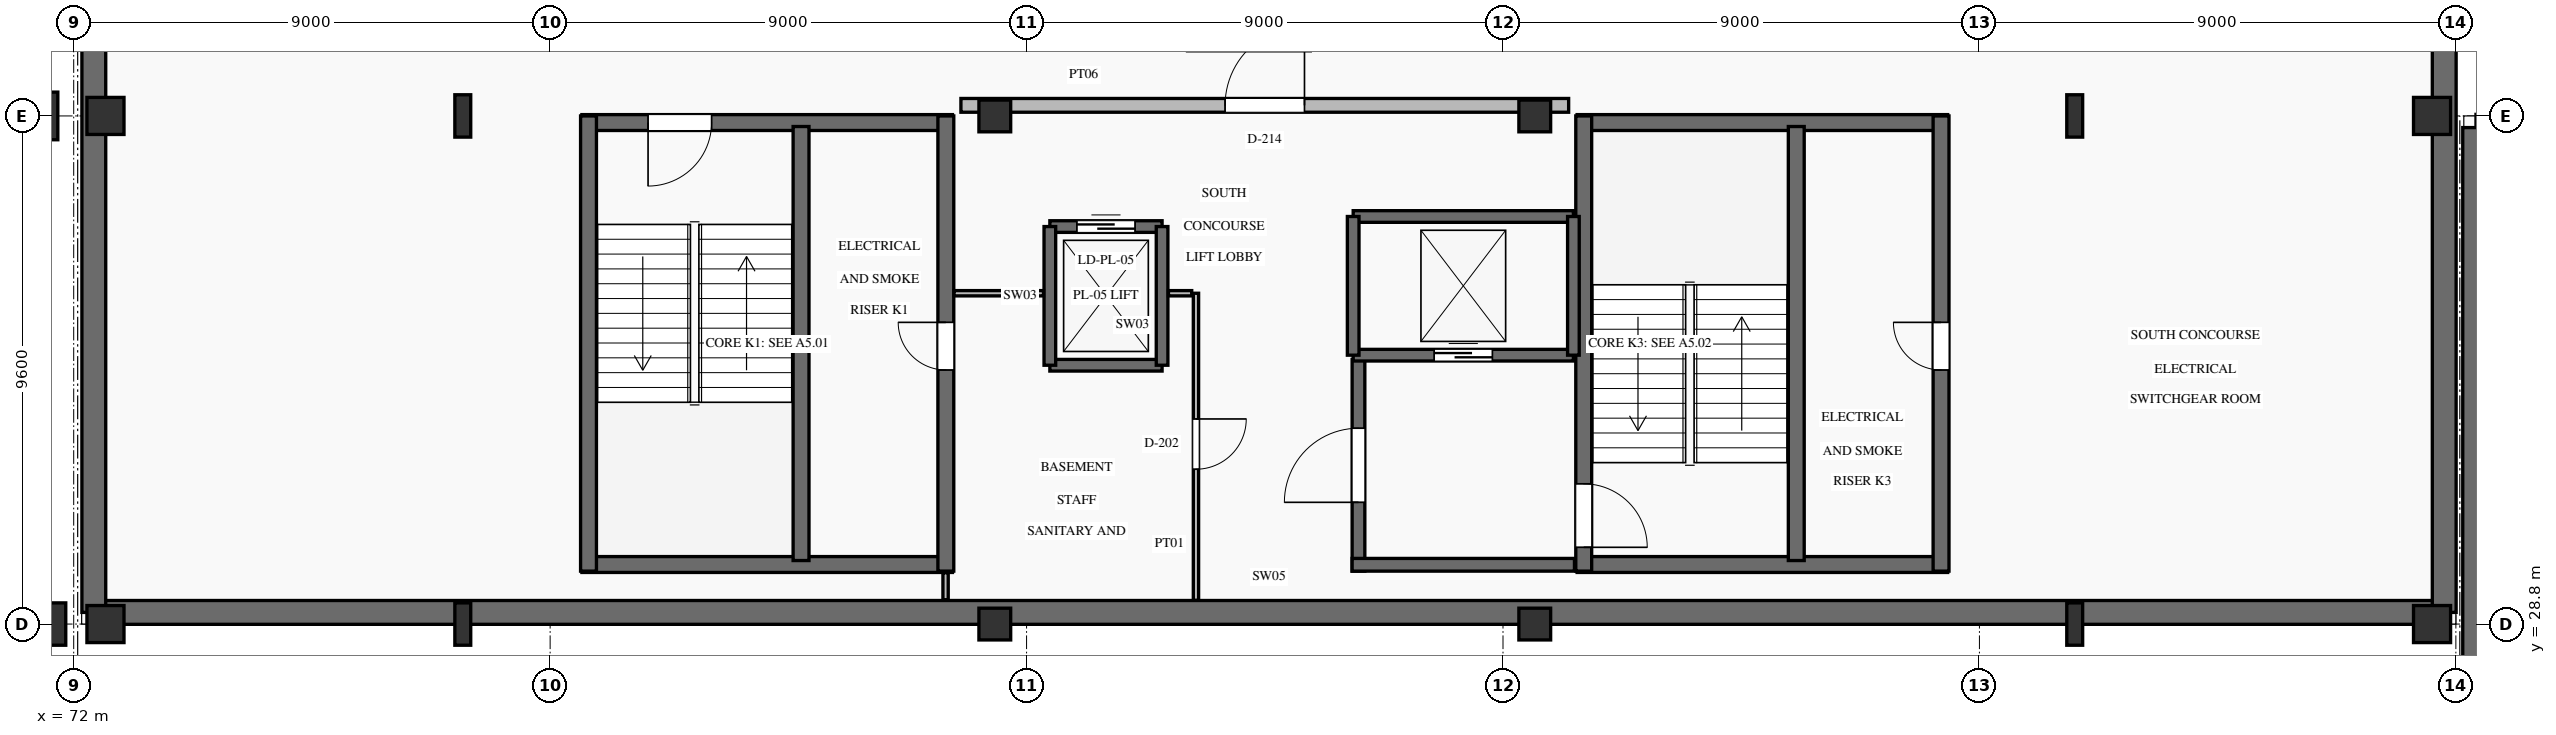
"""IFC4 building model, lengths in metres.
Left out: names, types, materials, properties, quantities, classifications, styles, units other than length and angle.
Written with IfcOpenShell. Run it as: python <this file> out.ifc"""

import sys

from ifc_helpers import new_model, si_unit, direction, frame, frame_2d, origin, origin_2d, place, context, subcontext, project, spatial, rectangle, i_section, extrude, element, fill, save


model = new_model("IFC4")
c1 = context("Model", 3, precision=1e-05, world=origin(), true_north=direction((0.0, 1.0)))
c2 = subcontext(c1, "Body", "Model", "MODEL_VIEW")
j1 = project(units=[si_unit("LENGTHUNIT", "METRE"), si_unit("PLANEANGLEUNIT", "RADIAN")], contexts=[c1])
p1 = place(None, origin())
s1 = spatial("IfcSite", under=j1, at=p1, CompositionType="ELEMENT")
p2 = place(p1, origin())
s2 = spatial("IfcBuilding", under=s1, at=p2, CompositionType="ELEMENT")
p3 = place(p2, frame((0.0, 0.0, -4.5)))
s3 = spatial("IfcBuildingStorey", under=s2, at=p3, CompositionType="ELEMENT", Elevation=-4.5)
p4 = place(p3, frame((71.55, 28.8, 0.0), z_axis=(0.0, 0.0, 1.0), x_axis=(1.0, 0.0, 0.0)))
e1 = element("IfcColumn", 1, at=p4, inside=s3, PredefinedType="COLUMN", context=c2, shape_type="SweptSolid", body=[
    extrude(rectangle(XDim=0.6, YDim=0.8, at=origin_2d()), origin(), (0.0, 0.0, 1.0), 4.5),
])
p5 = place(p3, frame((71.55, 38.4, 0.0), z_axis=(0.0, 0.0, 1.0), x_axis=(1.0, 0.0, 0.0)))
e2 = element("IfcColumn", 2, at=p5, inside=s3, PredefinedType="COLUMN", context=c2, shape_type="SweptSolid", body=[
    extrude(i_section(OverallWidth=0.3, OverallDepth=0.9, WebThickness=0.019, FlangeThickness=0.035, FilletRadius=0.03, at=origin_2d()), origin(), (0.0, 0.0, 1.0), 4.5),
])
for number, where, z_axis, x_axis in (
    (3, (72.6, 28.8, 0.0), (0.0, 0.0, 1.0), (1.0, 0.0, 0.0)),
    (4, (116.55, 28.8, 0.0), (0.0, 0.0, 1.0), (1.0, 0.0, 0.0)),
):
    element("IfcColumn", number, at=place(p3, frame(where, z_axis=z_axis, x_axis=x_axis)), inside=s3, PredefinedType="COLUMN", context=c2, shape_type="SweptSolid", body=[
        extrude(rectangle(XDim=0.7, YDim=0.7, at=origin_2d()), origin(), (0.0, 0.0, 1.0), 4.5),
    ])
for number, where, z_axis, x_axis in (
    (5, (79.35, 28.8, 0.0), (0.0, 0.0, 1.0), (1.0, 0.0, 0.0)),
    (6, (109.8, 28.8, 0.0), (0.0, 0.0, 1.0), (1.0, 0.0, 0.0)),
):
    element("IfcColumn", number, at=place(p3, frame(where, z_axis=z_axis, x_axis=x_axis)), inside=s3, PredefinedType="COLUMN", context=c2, shape_type="SweptSolid", body=[
        extrude(i_section(OverallWidth=0.3, OverallDepth=0.8, WebThickness=0.018, FlangeThickness=0.033, FilletRadius=0.03, at=origin_2d()), origin(), (0.0, 0.0, 1.0), 4.5),
    ])
for number, where, z_axis, x_axis in (
    (7, (72.6, 38.4, 0.0), (0.0, 0.0, 1.0), (1.0, 0.0, 0.0)),
    (8, (116.55, 38.4, 0.0), (0.0, 0.0, 1.0), (1.0, 0.0, 0.0)),
):
    element("IfcColumn", number, at=place(p3, frame(where, z_axis=z_axis, x_axis=x_axis)), inside=s3, PredefinedType="COLUMN", context=c2, shape_type="SweptSolid", body=[
        extrude(rectangle(XDim=0.7, YDim=0.7, at=origin_2d()), origin(), (0.0, 0.0, 1.0), 4.5),
    ])
for number, where, z_axis, x_axis in (
    (9, (79.35, 38.4, 0.0), (0.0, 0.0, 1.0), (1.0, 0.0, 0.0)),
    (10, (109.8, 38.4, 0.0), (0.0, 0.0, 1.0), (1.0, 0.0, 0.0)),
):
    element("IfcColumn", number, at=place(p3, frame(where, z_axis=z_axis, x_axis=x_axis)), inside=s3, PredefinedType="COLUMN", context=c2, shape_type="SweptSolid", body=[
        extrude(i_section(OverallWidth=0.3, OverallDepth=0.8, WebThickness=0.018, FlangeThickness=0.033, FilletRadius=0.03, at=origin_2d()), origin(), (0.0, 0.0, 1.0), 4.5),
    ])
for number, where, z_axis, x_axis in (
    (11, (89.4, 28.8, 0.0), (0.0, 0.0, 1.0), (1.0, 0.0, 0.0)),
    (12, (89.4, 38.4, 0.0), (0.0, 0.0, 1.0), (1.0, 0.0, 0.0)),
    (13, (99.6, 28.8, 0.0), (0.0, 0.0, 1.0), (1.0, 0.0, 0.0)),
    (14, (99.6, 38.4, 0.0), (0.0, 0.0, 1.0), (1.0, 0.0, 0.0)),
):
    element("IfcColumn", number, at=place(p3, frame(where, z_axis=z_axis, x_axis=x_axis)), inside=s3, PredefinedType="COLUMN", context=c2, shape_type="SweptSolid", body=[
        extrude(rectangle(XDim=0.6, YDim=0.6, at=origin_2d()), origin(), (0.0, 0.0, 1.0), 4.5),
    ])
p6 = place(p3, frame((72.38, 29.02, 0.0), z_axis=(0.0, 0.0, 1.0), x_axis=(1.0, 0.0, 0.0)))
e15 = element("IfcWall", 15, at=p6, inside=s3, PredefinedType="SHEAR", context=c2, shape_type="SweptSolid", body=[
    extrude(rectangle(XDim=44.4, YDim=0.45, at=frame_2d((22.2, 0.0))), origin(), (0.0, 0.0, 1.0), 4.2),
])
for number, where, z_axis, x_axis in (
    (16, (116.78, 29.02, 0.0), (0.0, 0.0, 1.0), (0.0, 1.0, 0.0)),
    (17, (72.38, 95.78, 0.0), (0.0, 0.0, 1.0), (0.0, -1.0, 0.0)),
):
    element("IfcWall", number, at=place(p3, frame(where, z_axis=z_axis, x_axis=x_axis)), inside=s3, PredefinedType="SHEAR", context=c2, shape_type="SweptSolid", body=[
        extrude(rectangle(XDim=66.76, YDim=0.45, at=frame_2d((33.38, 0.0))), origin(), (0.0, 0.0, 1.0), 4.2),
    ])
p7 = place(p3, frame((179.62, 38.18, 0.0), z_axis=(0.0, 0.0, 1.0), x_axis=(-1.0, 0.0, 0.0)))
e18 = element("IfcWall", 18, at=p7, inside=s3, PredefinedType="SHEAR", context=c2, shape_type="SweptSolid", body=[
    extrude(rectangle(XDim=62.24, YDim=0.5, at=frame_2d((31.12, 0.0))), origin(), (0.0, 0.0, 1.0), 4.2),
])
p8 = place(p3, frame((117.38, 38.18, 0.0), z_axis=(0.0, 0.0, 1.0), x_axis=(0.0, -1.0, 0.0)))
e19 = element("IfcWall", 19, at=p8, inside=s3, PredefinedType="SHEAR", context=c2, shape_type="SweptSolid", body=[
    extrude(rectangle(XDim=37.96, YDim=0.5, at=frame_2d((18.98, 0.0))), origin(), (0.0, 0.0, 1.0), 4.2),
])
p9 = place(p3, frame((81.6, 29.925, 0.0), z_axis=(0.0, 0.0, 1.0), x_axis=(1.0, 0.0, 0.0)))
e20 = element("IfcWall", 20, at=p9, inside=s3, PredefinedType="SHEAR", context=c2, shape_type="SweptSolid", body=[
    extrude(rectangle(XDim=7.0, YDim=0.3, at=frame_2d((3.5, 0.0))), origin(), (0.0, 0.0, 1.0), 4.5),
])
p10 = place(p3, frame((81.6, 38.275, 0.0), z_axis=(0.0, 0.0, 1.0), x_axis=(1.0, 0.0, 0.0)))
e21 = element("IfcWall", 21, at=p10, inside=s3, PredefinedType="SHEAR", context=c2, shape_type="SweptSolid", body=[
    extrude(rectangle(XDim=7.0, YDim=0.3, at=frame_2d((3.5, 0.0))), origin(), (0.0, 0.0, 1.0), 4.5),
])
p11 = place(p10, frame((1.25, 0.0, 0.0)))
e22 = element("IfcOpeningElement", 22, at=p11, cuts=e21, PredefinedType="OPENING", context=c2, shape_type="SweptSolid", body=[
    extrude(rectangle(XDim=1.2, YDim=2.15, at=frame_2d((0.6, 1.075))), frame((0.0, 0.165, 0.0), z_axis=(0.0, -1.0, 0.0), x_axis=(1.0, 0.0, 0.0)), (0.0, 0.0, 1.0), 0.33),
])
p12 = place(p3, frame((81.725, 29.8, 0.0), z_axis=(0.0, 0.0, 1.0), x_axis=(0.0, 1.0, 0.0)))
e23 = element("IfcWall", 23, at=p12, inside=s3, PredefinedType="SHEAR", context=c2, shape_type="SweptSolid", body=[
    extrude(rectangle(XDim=8.6, YDim=0.3, at=frame_2d((4.3, 0.0))), origin(), (0.0, 0.0, 1.0), 4.5),
])
p13 = place(p3, frame((88.475, 29.8, 0.0), z_axis=(0.0, 0.0, 1.0), x_axis=(0.0, 1.0, 0.0)))
e24 = element("IfcWall", 24, at=p13, inside=s3, PredefinedType="SHEAR", context=c2, shape_type="SweptSolid", body=[
    extrude(rectangle(XDim=8.6, YDim=0.3, at=frame_2d((4.3, 0.0))), origin(), (0.0, 0.0, 1.0), 4.5),
])
p14 = place(p13, frame((3.8, 0.0, 0.0)))
e25 = element("IfcOpeningElement", 25, at=p14, cuts=e24, PredefinedType="OPENING", context=c2, shape_type="SweptSolid", body=[
    extrude(rectangle(XDim=0.9, YDim=2.05, at=frame_2d((0.45, 1.025))), frame((0.0, 0.165, 0.0), z_axis=(0.0, -1.0, 0.0), x_axis=(1.0, 0.0, 0.0)), (0.0, 0.0, 1.0), 0.33),
])
p15 = place(p3, frame((85.74, 30.0, 0.0), z_axis=(0.0, 0.0, 1.0), x_axis=(0.0, 1.0, 0.0)))
e26 = element("IfcWall", 26, at=p15, inside=s3, PredefinedType="SHEAR", context=c2, shape_type="SweptSolid", body=[
    extrude(rectangle(XDim=8.2, YDim=0.3, at=frame_2d((4.1, 0.0))), origin(), (0.0, 0.0, 1.0), 4.5),
])
for number, where, z_axis, x_axis in (
    (27, (100.4, 29.925, 0.0), (0.0, 0.0, 1.0), (1.0, 0.0, 0.0)),
    (28, (100.4, 38.275, 0.0), (0.0, 0.0, 1.0), (1.0, 0.0, 0.0)),
):
    element("IfcWall", number, at=place(p3, frame(where, z_axis=z_axis, x_axis=x_axis)), inside=s3, PredefinedType="SHEAR", context=c2, shape_type="SweptSolid", body=[
        extrude(rectangle(XDim=7.0, YDim=0.3, at=frame_2d((3.5, 0.0))), origin(), (0.0, 0.0, 1.0), 4.5),
    ])
p16 = place(p3, frame((100.525, 29.8, 0.0), z_axis=(0.0, 0.0, 1.0), x_axis=(0.0, 1.0, 0.0)))
e29 = element("IfcWall", 29, at=p16, inside=s3, PredefinedType="SHEAR", context=c2, shape_type="SweptSolid", body=[
    extrude(rectangle(XDim=8.6, YDim=0.3, at=frame_2d((4.3, 0.0))), origin(), (0.0, 0.0, 1.0), 4.5),
])
p17 = place(p16, frame((0.45, 0.0, 0.0)))
e30 = element("IfcOpeningElement", 30, at=p17, cuts=e29, PredefinedType="OPENING", context=c2, shape_type="SweptSolid", body=[
    extrude(rectangle(XDim=1.2, YDim=2.15, at=frame_2d((0.6, 1.075))), frame((0.0, 0.165, 0.0), z_axis=(0.0, -1.0, 0.0), x_axis=(1.0, 0.0, 0.0)), (0.0, 0.0, 1.0), 0.33),
])
p18 = place(p3, frame((107.275, 29.8, 0.0), z_axis=(0.0, 0.0, 1.0), x_axis=(0.0, 1.0, 0.0)))
e31 = element("IfcWall", 31, at=p18, inside=s3, PredefinedType="SHEAR", context=c2, shape_type="SweptSolid", body=[
    extrude(rectangle(XDim=8.6, YDim=0.3, at=frame_2d((4.3, 0.0))), origin(), (0.0, 0.0, 1.0), 4.5),
])
p19 = place(p18, frame((3.8, 0.0, 0.0)))
e32 = element("IfcOpeningElement", 32, at=p19, cuts=e31, PredefinedType="OPENING", context=c2, shape_type="SweptSolid", body=[
    extrude(rectangle(XDim=0.9, YDim=2.05, at=frame_2d((0.45, 1.025))), frame((0.0, 0.165, 0.0), z_axis=(0.0, -1.0, 0.0), x_axis=(1.0, 0.0, 0.0)), (0.0, 0.0, 1.0), 0.33),
])
p20 = place(p3, frame((104.54, 30.0, 0.0), z_axis=(0.0, 0.0, 1.0), x_axis=(0.0, 1.0, 0.0)))
e33 = element("IfcWall", 33, at=p20, inside=s3, PredefinedType="SHEAR", context=c2, shape_type="SweptSolid", body=[
    extrude(rectangle(XDim=8.2, YDim=0.3, at=frame_2d((4.1, 0.0))), origin(), (0.0, 0.0, 1.0), 4.5),
])
p21 = place(p3, frame((96.27, 29.8, 0.0), z_axis=(0.0, 0.0, 1.0), x_axis=(0.0, 1.0, 0.0)))
e34 = element("IfcWall", 34, at=p21, inside=s3, PredefinedType="SHEAR", context=c2, shape_type="SweptSolid", body=[
    extrude(rectangle(XDim=4.0, YDim=0.24, at=frame_2d((2.0, 0.0))), origin(), (0.0, 0.0, 1.0), 4.5),
])
p22 = place(p21, frame((1.3, 0.0, 0.0)))
e35 = element("IfcOpeningElement", 35, at=p22, cuts=e34, PredefinedType="OPENING", context=c2, shape_type="SweptSolid", body=[
    extrude(rectangle(XDim=1.4, YDim=2.2, at=frame_2d((0.7, 1.1))), frame((0.0, 0.135, 0.0), z_axis=(0.0, -1.0, 0.0), x_axis=(1.0, 0.0, 0.0)), (0.0, 0.0, 1.0), 0.27),
])
p23 = place(p3, frame((96.15, 29.92, 0.0), z_axis=(0.0, 0.0, 1.0), x_axis=(1.0, 0.0, 0.0)))
e36 = element("IfcWall", 36, at=p23, inside=s3, PredefinedType="SHEAR", context=c2, shape_type="SweptSolid", body=[
    extrude(rectangle(XDim=4.2, YDim=0.24, at=frame_2d((2.1, 0.0))), origin(), (0.0, 0.0, 1.0), 4.5),
])
p24 = place(p3, frame((90.44, 33.69, 0.0), z_axis=(0.0, 0.0, 1.0), x_axis=(1.0, 0.0, 0.0)))
e37 = element("IfcWall", 37, at=p24, inside=s3, PredefinedType="SHEAR", context=c2, shape_type="SweptSolid", body=[
    extrude(rectangle(XDim=2.12, YDim=0.22, at=frame_2d((1.06, 0.0))), origin(), (0.0, 0.0, 1.0), 4.5),
])
p25 = place(p3, frame((90.44, 36.31, 0.0), z_axis=(0.0, 0.0, 1.0), x_axis=(1.0, 0.0, 0.0)))
e38 = element("IfcWall", 38, at=p25, inside=s3, PredefinedType="SHEAR", context=c2, shape_type="SweptSolid", body=[
    extrude(rectangle(XDim=2.12, YDim=0.22, at=frame_2d((1.06, 0.0))), origin(), (0.0, 0.0, 1.0), 4.5),
])
p26 = place(p25, frame((0.51, 0.0, 0.0)))
e39 = element("IfcOpeningElement", 39, at=p26, cuts=e38, PredefinedType="OPENING", context=c2, shape_type="SweptSolid", body=[
    extrude(rectangle(XDim=1.1, YDim=2.15, at=frame_2d((0.55, 1.075))), frame((0.0, 0.125, 0.0), z_axis=(0.0, -1.0, 0.0), x_axis=(1.0, 0.0, 0.0)), (0.0, 0.0, 1.0), 0.25),
])
for number, where, z_axis, x_axis in (
    (40, (90.44, 33.69, 0.0), (0.0, 0.0, 1.0), (0.0, 1.0, 0.0)),
    (41, (92.56, 33.69, 0.0), (0.0, 0.0, 1.0), (0.0, 1.0, 0.0)),
):
    element("IfcWall", number, at=place(p3, frame(where, z_axis=z_axis, x_axis=x_axis)), inside=s3, PredefinedType="SHEAR", context=c2, shape_type="SweptSolid", body=[
        extrude(rectangle(XDim=2.62, YDim=0.22, at=frame_2d((1.31, 0.0))), origin(), (0.0, 0.0, 1.0), 4.5),
    ])
p27 = place(p3, frame((96.17, 33.88, 0.0), z_axis=(0.0, 0.0, 1.0), x_axis=(1.0, 0.0, 0.0)))
e42 = element("IfcWall", 42, at=p27, inside=s3, PredefinedType="SHEAR", context=c2, shape_type="SweptSolid", body=[
    extrude(rectangle(XDim=4.16, YDim=0.22, at=frame_2d((2.08, 0.0))), origin(), (0.0, 0.0, 1.0), 4.5),
])
p28 = place(p27, frame((1.53, 0.0, 0.0)))
e43 = element("IfcOpeningElement", 43, at=p28, cuts=e42, PredefinedType="OPENING", context=c2, shape_type="SweptSolid", body=[
    extrude(rectangle(XDim=1.1, YDim=2.15, at=frame_2d((0.55, 1.075))), frame((0.0, 0.125, 0.0), z_axis=(0.0, -1.0, 0.0), x_axis=(1.0, 0.0, 0.0)), (0.0, 0.0, 1.0), 0.25),
])
p29 = place(p3, frame((96.17, 36.5, 0.0), z_axis=(0.0, 0.0, 1.0), x_axis=(1.0, 0.0, 0.0)))
e44 = element("IfcWall", 44, at=p29, inside=s3, PredefinedType="SHEAR", context=c2, shape_type="SweptSolid", body=[
    extrude(rectangle(XDim=4.16, YDim=0.22, at=frame_2d((2.08, 0.0))), origin(), (0.0, 0.0, 1.0), 4.5),
])
for number, where, z_axis, x_axis in (
    (45, (96.17, 33.88, 0.0), (0.0, 0.0, 1.0), (0.0, 1.0, 0.0)),
    (46, (100.33, 33.88, 0.0), (0.0, 0.0, 1.0), (0.0, 1.0, 0.0)),
):
    element("IfcWall", number, at=place(p3, frame(where, z_axis=z_axis, x_axis=x_axis)), inside=s3, PredefinedType="SHEAR", context=c2, shape_type="SweptSolid", body=[
        extrude(rectangle(XDim=2.62, YDim=0.22, at=frame_2d((1.31, 0.0))), origin(), (0.0, 0.0, 1.0), 4.5),
    ])
p30 = place(p3, frame((93.2, 29.25, 0.0), z_axis=(0.0, 0.0, 1.0), x_axis=(0.0, 1.0, 0.0)))
e47 = element("IfcWall", 47, at=p30, inside=s3, PredefinedType="PARTITIONING", context=c2, shape_type="SweptSolid", body=[
    extrude(rectangle(XDim=5.8, YDim=0.1, at=frame_2d((2.9, 0.0))), origin(), (0.0, 0.0, 1.0), 4.2),
])
p31 = place(p30, frame((2.475, 0.0, 0.0)))
e48 = element("IfcOpeningElement", 48, at=p31, cuts=e47, PredefinedType="OPENING", context=c2, shape_type="SweptSolid", body=[
    extrude(rectangle(XDim=0.95, YDim=2.1, at=frame_2d((0.475, 1.05))), frame((0.0, 0.065, 0.0), z_axis=(0.0, -1.0, 0.0), x_axis=(1.0, 0.0, 0.0)), (0.0, 0.0, 1.0), 0.13),
])
p32 = place(p3, frame((88.76, 38.6, 0.0), z_axis=(0.0, 0.0, 1.0), x_axis=(1.0, 0.0, 0.0)))
e49 = element("IfcWall", 49, at=p32, inside=s3, PredefinedType="PARTITIONING", context=c2, shape_type="SweptSolid", body=[
    extrude(rectangle(XDim=11.48, YDim=0.26, at=frame_2d((5.74, 0.0))), origin(), (0.0, 0.0, 1.0), 3.3),
])
p33 = place(p32, frame((4.99, 0.0, 0.0)))
e50 = element("IfcOpeningElement", 50, at=p33, cuts=e49, PredefinedType="OPENING", context=c2, shape_type="SweptSolid", body=[
    extrude(rectangle(XDim=1.5, YDim=2.25, at=frame_2d((0.75, 1.125))), frame((0.0, 0.145, 0.0), z_axis=(0.0, -1.0, 0.0), x_axis=(1.0, 0.0, 0.0)), (0.0, 0.0, 1.0), 0.29),
])
p34 = place(p3, frame((88.63, 35.05, 0.0), z_axis=(0.0, 0.0, 1.0), x_axis=(1.0, 0.0, 0.0)))
e51 = element("IfcWall", 51, at=p34, inside=s3, PredefinedType="PARTITIONING", context=c2, shape_type="SweptSolid", body=[
    extrude(rectangle(XDim=1.69, YDim=0.1, at=frame_2d((0.845, 0.0))), origin(), (0.0, 0.0, 1.0), 4.2),
])
p35 = place(p3, frame((92.68, 35.05, 0.0), z_axis=(0.0, 0.0, 1.0), x_axis=(1.0, 0.0, 0.0)))
e52 = element("IfcWall", 52, at=p35, inside=s3, PredefinedType="PARTITIONING", context=c2, shape_type="SweptSolid", body=[
    extrude(rectangle(XDim=0.44, YDim=0.1, at=frame_2d((0.22, 0.0))), origin(), (0.0, 0.0, 1.0), 4.2),
])
p36 = place(p3, frame((88.47, 29.26, 0.0), z_axis=(0.0, 0.0, 1.0), x_axis=(0.0, 1.0, 0.0)))
e53 = element("IfcWall", 53, at=p36, inside=s3, PredefinedType="PARTITIONING", context=c2, shape_type="SweptSolid", body=[
    extrude(rectangle(XDim=0.51, YDim=0.1, at=frame_2d((0.255, 0.0))), origin(), (0.0, 0.0, 1.0), 4.2),
])
p37 = place(p11, frame((1.2, 0.0, 0.0), z_axis=(0.0, 0.0, 1.0), x_axis=(-1.0, 0.0, 0.0)))
e54 = element("IfcDoor", 54, at=p37, inside=s3, OperationType="SINGLE_SWING_LEFT", PredefinedType="DOOR", context=c2, shape_type="SweptSolid", body=[
    extrude(rectangle(XDim=1.2, YDim=2.15, at=frame_2d((0.6, 1.075))), frame((0.0, 0.025, 0.0), z_axis=(0.0, -1.0, 0.0), x_axis=(1.0, 0.0, 0.0)), (0.0, 0.0, 1.0), 0.05),
])
fill(e22, e54)
p38 = place(p14, origin())
e55 = element("IfcDoor", 55, at=p38, inside=s3, OperationType="SINGLE_SWING_RIGHT", PredefinedType="DOOR", context=c2, shape_type="SweptSolid", body=[
    extrude(rectangle(XDim=0.9, YDim=2.05, at=frame_2d((0.45, 1.025))), frame((0.0, 0.025, 0.0), z_axis=(0.0, -1.0, 0.0), x_axis=(1.0, 0.0, 0.0)), (0.0, 0.0, 1.0), 0.05),
])
fill(e25, e55)
p39 = place(p17, frame((1.2, 0.0, 0.0), z_axis=(0.0, 0.0, 1.0), x_axis=(-1.0, 0.0, 0.0)))
e56 = element("IfcDoor", 56, at=p39, inside=s3, OperationType="SINGLE_SWING_LEFT", PredefinedType="DOOR", context=c2, shape_type="SweptSolid", body=[
    extrude(rectangle(XDim=1.2, YDim=2.15, at=frame_2d((0.6, 1.075))), frame((0.0, 0.025, 0.0), z_axis=(0.0, -1.0, 0.0), x_axis=(1.0, 0.0, 0.0)), (0.0, 0.0, 1.0), 0.05),
])
fill(e30, e56)
p40 = place(p19, origin())
e57 = element("IfcDoor", 57, at=p40, inside=s3, OperationType="SINGLE_SWING_RIGHT", PredefinedType="DOOR", context=c2, shape_type="SweptSolid", body=[
    extrude(rectangle(XDim=0.9, YDim=2.05, at=frame_2d((0.45, 1.025))), frame((0.0, 0.025, 0.0), z_axis=(0.0, -1.0, 0.0), x_axis=(1.0, 0.0, 0.0)), (0.0, 0.0, 1.0), 0.05),
])
fill(e32, e57)
p41 = place(p22, origin())
e58 = element("IfcDoor", 58, at=p41, inside=s3, OperationType="SINGLE_SWING_LEFT", PredefinedType="DOOR", context=c2, shape_type="SweptSolid", body=[
    extrude(rectangle(XDim=1.4, YDim=2.2, at=frame_2d((0.7, 1.1))), frame((0.0, 0.025, 0.0), z_axis=(0.0, -1.0, 0.0), x_axis=(1.0, 0.0, 0.0)), (0.0, 0.0, 1.0), 0.05),
])
fill(e35, e58)
p42 = place(p26, origin())
e59 = element("IfcDoor", 59, at=p42, inside=s3, OperationType="SLIDING_TO_LEFT", PredefinedType="DOOR", context=c2, shape_type="SweptSolid", body=[
    extrude(rectangle(XDim=1.1, YDim=2.15, at=frame_2d((0.55, 1.075))), frame((0.0, 0.025, 0.0), z_axis=(0.0, -1.0, 0.0), x_axis=(1.0, 0.0, 0.0)), (0.0, 0.0, 1.0), 0.05),
])
fill(e39, e59)
p43 = place(p28, origin())
e60 = element("IfcDoor", 60, at=p43, inside=s3, OperationType="SLIDING_TO_RIGHT", PredefinedType="DOOR", context=c2, shape_type="SweptSolid", body=[
    extrude(rectangle(XDim=1.1, YDim=2.15, at=frame_2d((0.55, 1.075))), frame((0.0, 0.025, 0.0), z_axis=(0.0, -1.0, 0.0), x_axis=(1.0, 0.0, 0.0)), (0.0, 0.0, 1.0), 0.05),
])
fill(e43, e60)
p44 = place(p31, frame((0.95, 0.0, 0.0), z_axis=(0.0, 0.0, 1.0), x_axis=(-1.0, 0.0, 0.0)))
e61 = element("IfcDoor", 61, at=p44, inside=s3, OperationType="SINGLE_SWING_RIGHT", PredefinedType="DOOR", context=c2, shape_type="SweptSolid", body=[
    extrude(rectangle(XDim=0.95, YDim=2.1, at=frame_2d((0.475, 1.05))), frame((0.0, 0.025, 0.0), z_axis=(0.0, -1.0, 0.0), x_axis=(1.0, 0.0, 0.0)), (0.0, 0.0, 1.0), 0.05),
])
fill(e48, e61)
p45 = place(p33, origin())
e62 = element("IfcDoor", 62, at=p45, inside=s3, OperationType="SINGLE_SWING_RIGHT", PredefinedType="DOOR", context=c2, shape_type="SweptSolid", body=[
    extrude(rectangle(XDim=1.5, YDim=2.25, at=frame_2d((0.75, 1.125))), frame((0.0, 0.025, 0.0), z_axis=(0.0, -1.0, 0.0), x_axis=(1.0, 0.0, 0.0)), (0.0, 0.0, 1.0), 0.05),
])
fill(e50, e62)
save(model, sys.argv[1])
